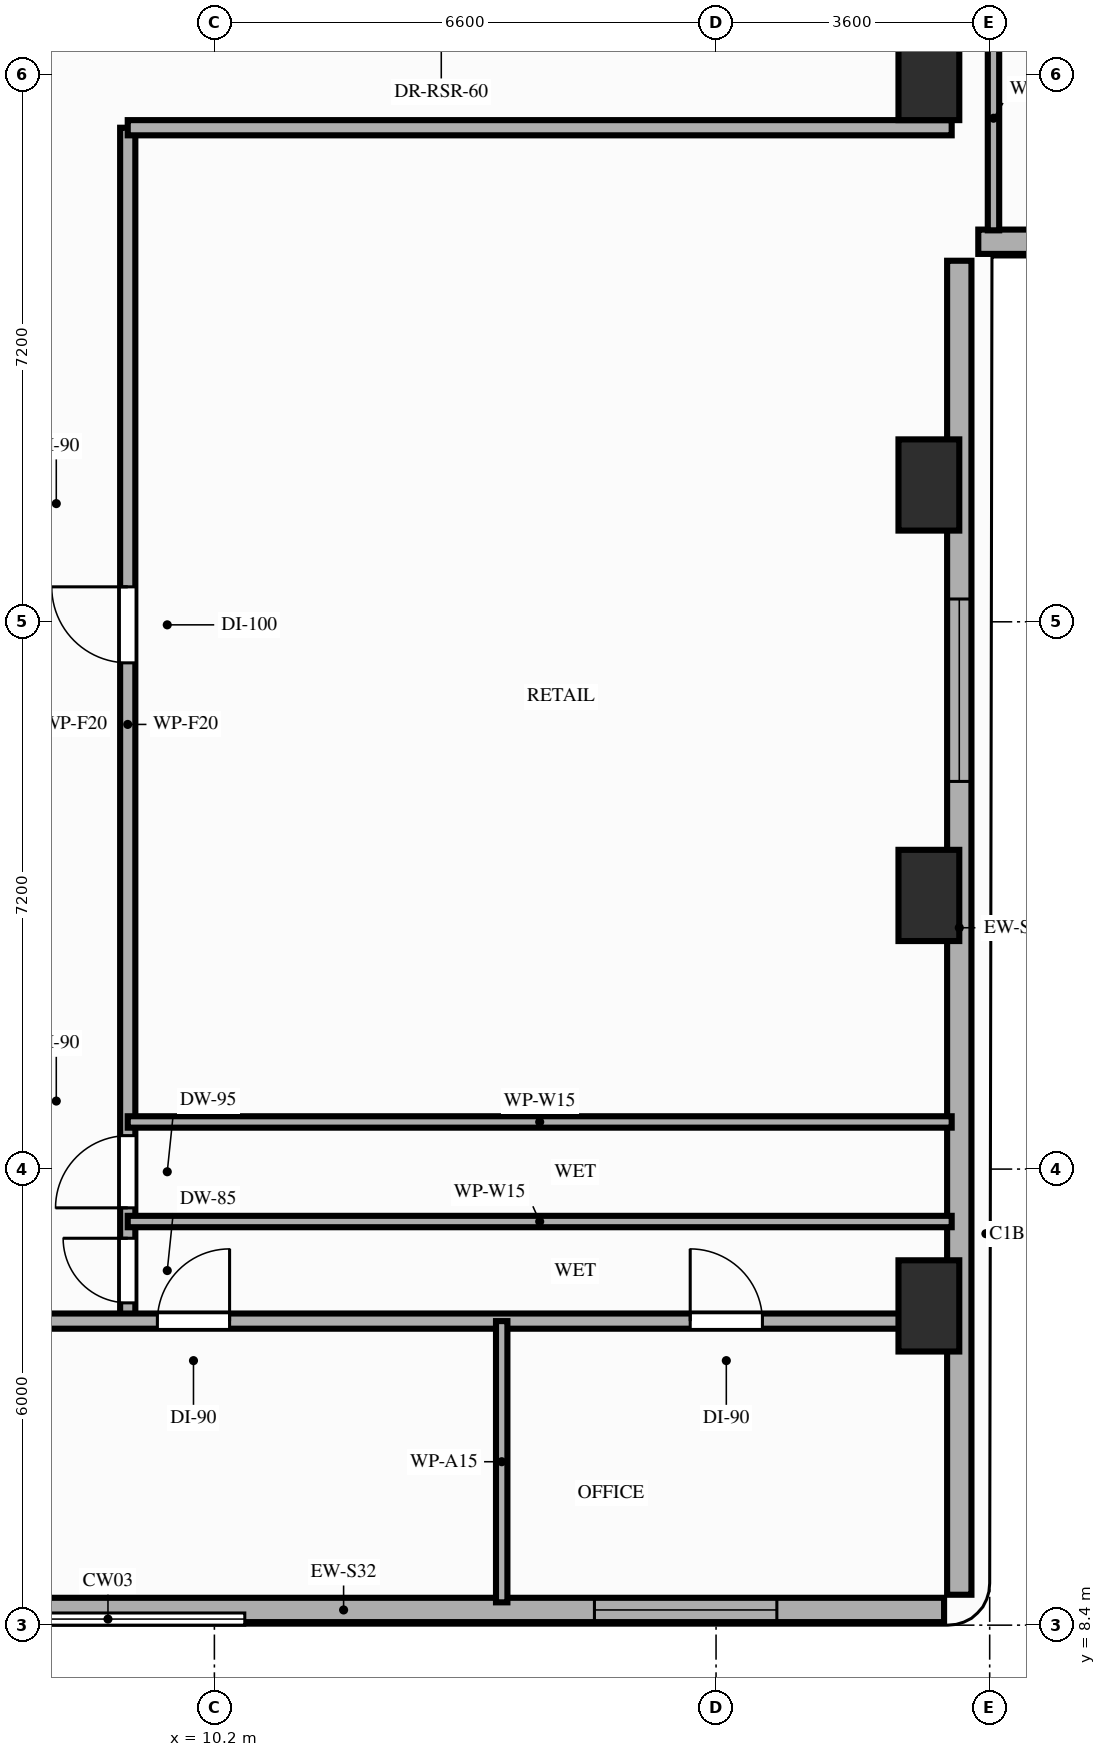
"""IFC4 building model, lengths in metres.
Left out: names, types, materials, properties, quantities, classifications, styles, units other than length and angle.
Written with IfcOpenShell. Run it as: python <this file> out.ifc"""

import sys

from ifc_helpers import new_model, si_unit, direction, frame, frame_2d, origin, origin_2d, place, context, subcontext, project, spatial, rectangle, extrude, element, fill, save


model = new_model("IFC4")
c1 = context("Model", 3, precision=1e-05, world=origin(), true_north=direction((0.0, 1.0)))
c2 = subcontext(c1, "Body", "Model", "MODEL_VIEW")
j1 = project(units=[si_unit("LENGTHUNIT", "METRE"), si_unit("PLANEANGLEUNIT", "RADIAN")], contexts=[c1])
p1 = place(None, origin())
s1 = spatial("IfcSite", under=j1, at=p1, CompositionType="ELEMENT")
p2 = place(p1, origin())
s2 = spatial("IfcBuilding", under=s1, at=p2, CompositionType="ELEMENT")
p3 = place(p2, frame((0.0, 0.0, 72.4)))
s3 = spatial("IfcBuildingStorey", under=s2, at=p3, CompositionType="ELEMENT", Elevation=72.4)
for number, where, z_axis, x_axis in (
    (1, (19.6, 12.6, 0.0), (0.0, 0.0, 1.0), (1.0, 0.0, 0.0)),
    (2, (19.6, 18.0, 0.0), (0.0, 0.0, 1.0), (1.0, 0.0, 0.0)),
    (3, (19.6, 23.4, 0.0), (0.0, 0.0, 1.0), (1.0, 0.0, 0.0)),
    (4, (19.6, 28.8, 0.0), (0.0, 0.0, 1.0), (1.0, 0.0, 0.0)),
):
    element("IfcColumn", number, at=place(p3, frame(where, z_axis=z_axis, x_axis=x_axis)), inside=s3, PredefinedType="COLUMN", context=c2, shape_type="SweptSolid", body=[
        extrude(rectangle(XDim=0.8, YDim=1.2, at=origin_2d()), origin(), (0.0, 0.0, 1.0), 3.2),
    ])
p4 = place(p3, frame((4.0, 8.6, 0.0), z_axis=(0.0, 0.0, 1.0), x_axis=(1.0, 0.0, 0.0)))
e5 = element("IfcWall", 5, at=p4, inside=s3, PredefinedType="STANDARD", context=c2, shape_type="SweptSolid", body=[
    extrude(rectangle(XDim=15.8, YDim=0.32, at=frame_2d((7.9, 0.0))), origin(), (0.0, 0.0, 1.0), 2.96),
])
p5 = place(p4, frame((11.2, 0.0, 0.85)))
e6 = element("IfcOpeningElement", 6, at=p5, cuts=e5, PredefinedType="OPENING", context=c2, shape_type="SweptSolid", body=[
    extrude(rectangle(XDim=2.4, YDim=1.8, at=frame_2d((1.2, 0.9))), frame((0.0, 0.17, 0.0), z_axis=(0.0, -1.0, 0.0), x_axis=(1.0, 0.0, 0.0)), (0.0, 0.0, 1.0), 0.34),
])
p6 = place(p3, frame((20.0, 8.8, 0.0), z_axis=(0.0, 0.0, 1.0), x_axis=(0.0, 1.0, 0.0)))
e7 = element("IfcWall", 7, at=p6, inside=s3, PredefinedType="STANDARD", context=c2, shape_type="SweptSolid", body=[
    extrude(rectangle(XDim=17.55, YDim=0.32, at=frame_2d((8.775, 0.0))), origin(), (0.0, 0.0, 1.0), 2.35),
])
p7 = place(p6, frame((10.7, 0.0, 0.85)))
e8 = element("IfcOpeningElement", 8, at=p7, cuts=e7, PredefinedType="OPENING", context=c2, shape_type="SweptSolid", body=[
    extrude(rectangle(XDim=2.4, YDim=1.25, at=frame_2d((1.2, 0.625))), frame((0.0, 0.17, 0.0), z_axis=(0.0, -1.0, 0.0), x_axis=(1.0, 0.0, 0.0)), (0.0, 0.0, 1.0), 0.34),
])
p8 = place(p3, frame((20.25, 26.6, 0.0), z_axis=(0.0, 0.0, 1.0), x_axis=(1.0, 0.0, 0.0)))
e9 = element("IfcWall", 9, at=p8, inside=s3, PredefinedType="STANDARD", context=c2, shape_type="SweptSolid", body=[
    extrude(rectangle(XDim=26.15, YDim=0.32, at=frame_2d((13.075, 0.0))), origin(), (0.0, 0.0, 1.0), 2.96),
])
p9 = place(p8, frame((2.35, 0.0, 0.85)))
e10 = element("IfcOpeningElement", 10, at=p9, cuts=e9, PredefinedType="OPENING", context=c2, shape_type="SweptSolid", body=[
    extrude(rectangle(XDim=2.4, YDim=1.8, at=frame_2d((1.2, 0.9))), frame((0.0, 0.17, 0.0), z_axis=(0.0, -1.0, 0.0), x_axis=(1.0, 0.0, 0.0)), (0.0, 0.0, 1.0), 0.34),
])
p10 = place(p8, frame((7.33, 0.0, 0.85)))
e11 = element("IfcOpeningElement", 11, at=p10, cuts=e9, PredefinedType="OPENING", context=c2, shape_type="SweptSolid", body=[
    extrude(rectangle(XDim=2.4, YDim=1.8, at=frame_2d((1.2, 0.9))), frame((0.0, 0.17, 0.0), z_axis=(0.0, -1.0, 0.0), x_axis=(1.0, 0.0, 0.0)), (0.0, 0.0, 1.0), 0.34),
])
p11 = place(p3, frame((9.06, 12.4, 0.0), z_axis=(0.0, 0.0, 1.0), x_axis=(0.0, 1.0, 0.0)))
e12 = element("IfcWall", 12, at=p11, inside=s3, PredefinedType="PARTITIONING", context=c2, shape_type="SweptSolid", body=[
    extrude(rectangle(XDim=15.7, YDim=0.2, at=frame_2d((7.85, 0.0))), origin(), (0.0, 0.0, 1.0), 2.35),
])
p12 = place(p11, frame((0.24, 0.0, 0.0)))
e13 = element("IfcOpeningElement", 13, at=p12, cuts=e12, PredefinedType="OPENING", context=c2, shape_type="SweptSolid", body=[
    extrude(rectangle(XDim=0.85, YDim=2.1, at=frame_2d((0.425, 1.05))), frame((0.0, 0.11, 0.0), z_axis=(0.0, -1.0, 0.0), x_axis=(1.0, 0.0, 0.0)), (0.0, 0.0, 1.0), 0.22),
])
p13 = place(p11, frame((1.49, 0.0, 0.0)))
e14 = element("IfcOpeningElement", 14, at=p13, cuts=e12, PredefinedType="OPENING", context=c2, shape_type="SweptSolid", body=[
    extrude(rectangle(XDim=0.95, YDim=2.1, at=frame_2d((0.475, 1.05))), frame((0.0, 0.11, 0.0), z_axis=(0.0, -1.0, 0.0), x_axis=(1.0, 0.0, 0.0)), (0.0, 0.0, 1.0), 0.22),
])
p14 = place(p11, frame((8.66, 0.0, 0.0)))
e15 = element("IfcOpeningElement", 15, at=p14, cuts=e12, PredefinedType="OPENING", context=c2, shape_type="SweptSolid", body=[
    extrude(rectangle(XDim=1.0, YDim=2.15, at=frame_2d((0.5, 1.075))), frame((0.0, 0.11, 0.0), z_axis=(0.0, -1.0, 0.0), x_axis=(1.0, 0.0, 0.0)), (0.0, 0.0, 1.0), 0.22),
])
p15 = place(p3, frame((3.9, 12.4, 0.0), z_axis=(0.0, 0.0, 1.0), x_axis=(1.0, 0.0, 0.0)))
e16 = element("IfcWall", 16, at=p15, inside=s3, PredefinedType="PARTITIONING", context=c2, shape_type="SweptSolid", body=[
    extrude(rectangle(XDim=16.0, YDim=0.2, at=frame_2d((8.0, 0.0))), origin(), (0.0, 0.0, 1.0), 2.35),
])
p16 = place(p15, frame((5.55, 0.0, 0.0)))
e17 = element("IfcOpeningElement", 17, at=p16, cuts=e16, PredefinedType="OPENING", context=c2, shape_type="SweptSolid", body=[
    extrude(rectangle(XDim=0.95, YDim=2.15, at=frame_2d((0.475, 1.075))), frame((0.0, 0.11, 0.0), z_axis=(0.0, -1.0, 0.0), x_axis=(1.0, 0.0, 0.0)), (0.0, 0.0, 1.0), 0.22),
])
p17 = place(p15, frame((12.56, 0.0, 0.0)))
e18 = element("IfcOpeningElement", 18, at=p17, cuts=e16, PredefinedType="OPENING", context=c2, shape_type="SweptSolid", body=[
    extrude(rectangle(XDim=0.95, YDim=2.15, at=frame_2d((0.475, 1.075))), frame((0.0, 0.11, 0.0), z_axis=(0.0, -1.0, 0.0), x_axis=(1.0, 0.0, 0.0)), (0.0, 0.0, 1.0), 0.22),
])
p18 = place(p3, frame((9.06, 28.1, 0.0), z_axis=(0.0, 0.0, 1.0), x_axis=(1.0, 0.0, 0.0)))
e19 = element("IfcWall", 19, at=p18, inside=s3, PredefinedType="PARTITIONING", context=c2, shape_type="SweptSolid", body=[
    extrude(rectangle(XDim=10.84, YDim=0.2, at=frame_2d((5.42, 0.0))), origin(), (0.0, 0.0, 1.0), 2.35),
])
p19 = place(p3, frame((20.45, 26.75, 0.0), z_axis=(0.0, 0.0, 1.0), x_axis=(0.0, 1.0, 0.0)))
e20 = element("IfcWall", 20, at=p19, inside=s3, PredefinedType="PARTITIONING", context=c2, shape_type="SweptSolid", body=[
    extrude(rectangle(XDim=2.95, YDim=0.15, at=frame_2d((1.475, 0.0))), origin(), (0.0, 0.0, 1.0), 2.35),
])
p20 = place(p3, frame((13.98, 8.7, 0.0), z_axis=(0.0, 0.0, 1.0), x_axis=(0.0, 1.0, 0.0)))
e21 = element("IfcWall", 21, at=p20, inside=s3, PredefinedType="PARTITIONING", context=c2, shape_type="SweptSolid", body=[
    extrude(rectangle(XDim=3.7, YDim=0.15, at=frame_2d((1.85, 0.0))), origin(), (0.0, 0.0, 1.0), 2.35),
])
for number, where, z_axis, x_axis in (
    (22, (9.06, 13.71, 0.0), (0.0, 0.0, 1.0), (1.0, 0.0, 0.0)),
    (23, (9.06, 15.02, 0.0), (0.0, 0.0, 1.0), (1.0, 0.0, 0.0)),
):
    element("IfcWall", number, at=place(p3, frame(where, z_axis=z_axis, x_axis=x_axis)), inside=s3, PredefinedType="PARTITIONING", context=c2, shape_type="SweptSolid", body=[
        extrude(rectangle(XDim=10.84, YDim=0.15, at=frame_2d((5.42, 0.0))), origin(), (0.0, 0.0, 1.0), 2.35),
    ])
p21 = place(p7, origin())
e24 = element("IfcWindow", 24, at=p21, inside=s3, PartitioningType="SINGLE_PANEL", PredefinedType="WINDOW", context=c2, shape_type="SweptSolid", body=[
    extrude(rectangle(XDim=2.4, YDim=1.25, at=frame_2d((1.2, 0.625))), frame((0.0, 0.03, 0.0), z_axis=(0.0, -1.0, 0.0), x_axis=(1.0, 0.0, 0.0)), (0.0, 0.0, 1.0), 0.06),
])
fill(e8, e24)
p22 = place(p5, origin())
e25 = element("IfcWindow", 25, at=p22, inside=s3, PartitioningType="SINGLE_PANEL", PredefinedType="WINDOW", context=c2, shape_type="SweptSolid", body=[
    extrude(rectangle(XDim=2.4, YDim=1.8, at=frame_2d((1.2, 0.9))), frame((0.0, 0.03, 0.0), z_axis=(0.0, -1.0, 0.0), x_axis=(1.0, 0.0, 0.0)), (0.0, 0.0, 1.0), 0.06),
])
fill(e6, e25)
p23 = place(p16, origin())
e26 = element("IfcDoor", 26, at=p23, inside=s3, OperationType="SINGLE_SWING_RIGHT", PredefinedType="DOOR", context=c2, shape_type="SweptSolid", body=[
    extrude(rectangle(XDim=0.95, YDim=2.15, at=frame_2d((0.475, 1.075))), frame((0.0, 0.025, 0.0), z_axis=(0.0, -1.0, 0.0), x_axis=(1.0, 0.0, 0.0)), (0.0, 0.0, 1.0), 0.05),
])
fill(e17, e26)
p24 = place(p17, origin())
e27 = element("IfcDoor", 27, at=p24, inside=s3, OperationType="SINGLE_SWING_LEFT", PredefinedType="DOOR", context=c2, shape_type="SweptSolid", body=[
    extrude(rectangle(XDim=0.95, YDim=2.15, at=frame_2d((0.475, 1.075))), frame((0.0, 0.025, 0.0), z_axis=(0.0, -1.0, 0.0), x_axis=(1.0, 0.0, 0.0)), (0.0, 0.0, 1.0), 0.05),
])
fill(e18, e27)
p25 = place(p12, origin())
e28 = element("IfcDoor", 28, at=p25, inside=s3, OperationType="SINGLE_SWING_RIGHT", PredefinedType="DOOR", context=c2, shape_type="SweptSolid", body=[
    extrude(rectangle(XDim=0.85, YDim=2.1, at=frame_2d((0.425, 1.05))), frame((0.0, 0.025, 0.0), z_axis=(0.0, -1.0, 0.0), x_axis=(1.0, 0.0, 0.0)), (0.0, 0.0, 1.0), 0.05),
])
fill(e13, e28)
p26 = place(p13, origin())
e29 = element("IfcDoor", 29, at=p26, inside=s3, OperationType="SINGLE_SWING_LEFT", PredefinedType="DOOR", context=c2, shape_type="SweptSolid", body=[
    extrude(rectangle(XDim=0.95, YDim=2.1, at=frame_2d((0.475, 1.05))), frame((0.0, 0.025, 0.0), z_axis=(0.0, -1.0, 0.0), x_axis=(1.0, 0.0, 0.0)), (0.0, 0.0, 1.0), 0.05),
])
fill(e14, e29)
p27 = place(p14, origin())
e30 = element("IfcDoor", 30, at=p27, inside=s3, OperationType="SINGLE_SWING_RIGHT", PredefinedType="DOOR", context=c2, shape_type="SweptSolid", body=[
    extrude(rectangle(XDim=1.0, YDim=2.15, at=frame_2d((0.5, 1.075))), frame((0.0, 0.025, 0.0), z_axis=(0.0, -1.0, 0.0), x_axis=(1.0, 0.0, 0.0)), (0.0, 0.0, 1.0), 0.05),
])
fill(e15, e30)
save(model, sys.argv[1])
